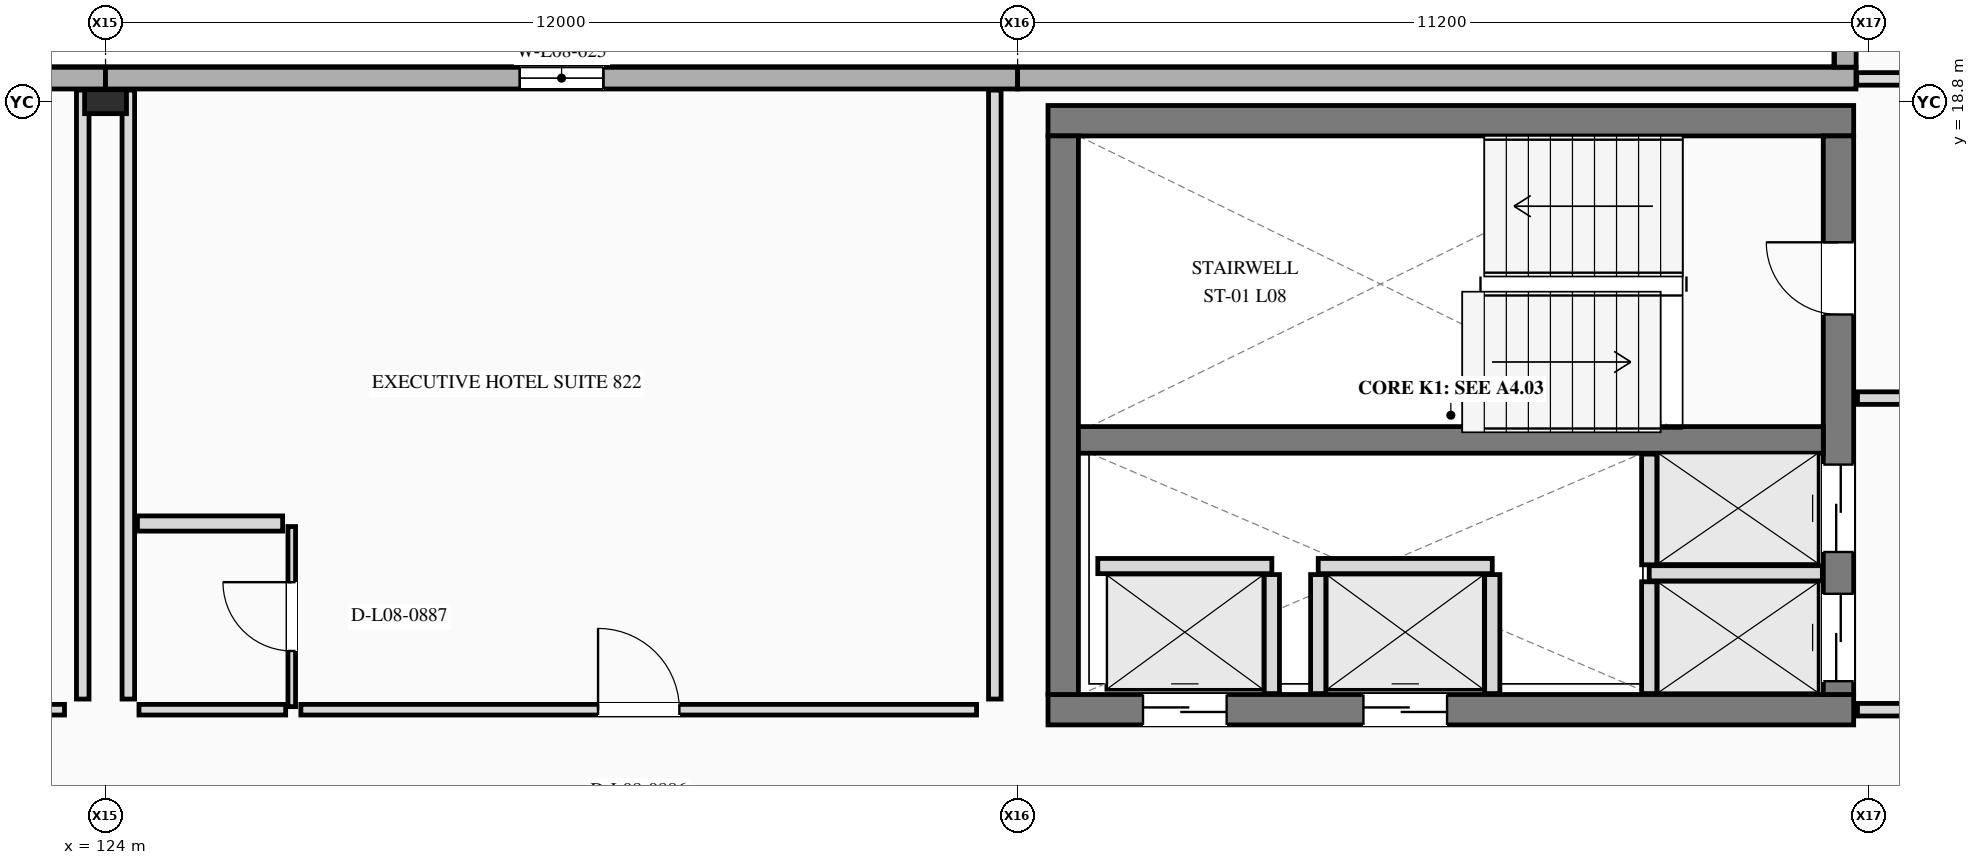
"""IFC4 building model, lengths in metres.
Left out: names, types, materials, properties, quantities, classifications, styles, units other than length and angle.
Written with IfcOpenShell. Run it as: python <this file> out.ifc"""

import sys

from ifc_helpers import new_model, si_unit, direction, frame, frame_2d, origin, origin_2d, place, context, subcontext, project, spatial, rectangle, i_section, extrude, element, fill, save


model = new_model("IFC4")
c1 = context("Model", 3, precision=1e-05, world=origin(), true_north=direction((0.0, 1.0)))
c2 = subcontext(c1, "Body", "Model", "MODEL_VIEW")
j1 = project(units=[si_unit("LENGTHUNIT", "METRE"), si_unit("PLANEANGLEUNIT", "RADIAN")], contexts=[c1])
p1 = place(None, origin())
s1 = spatial("IfcSite", under=j1, at=p1, CompositionType="ELEMENT")
p2 = place(p1, origin())
s2 = spatial("IfcBuilding", under=s1, at=p2, CompositionType="ELEMENT")
p3 = place(p2, frame((0.0, 0.0, 34.1)))
s3 = spatial("IfcBuildingStorey", under=s2, at=p3, CompositionType="ELEMENT", Elevation=34.1)
p4 = place(p3, frame((124.0, 18.8, 0.0), z_axis=(0.0, 0.0, 1.0), x_axis=(0.0, 1.0, 0.0)))
e1 = element("IfcColumn", 1, at=p4, inside=s3, PredefinedType="COLUMN", context=c2, shape_type="SweptSolid", body=[
    extrude(i_section(OverallWidth=0.315, OverallDepth=0.551, WebThickness=0.015, FlangeThickness=0.024, at=origin_2d()), origin(), (0.0, 0.0, 1.0), 3.5),
])
p5 = place(p3, frame((124.0, 19.11, 0.0), z_axis=(0.0, 0.0, 1.0), x_axis=(-1.0, 0.0, 0.0)))
e2 = element("IfcWall", 2, at=p5, inside=s3, PredefinedType="STANDARD", context=c2, shape_type="SweptSolid", body=[
    extrude(rectangle(XDim=12.0, YDim=0.285, at=frame_2d((6.0, 0.0))), origin(), (0.0, 0.0, 1.0), 3.5),
])
p6 = place(p5, frame((5.4, 0.0, 0.85)))
e3 = element("IfcOpeningElement", 3, at=p6, cuts=e2, PredefinedType="OPENING", context=c2, shape_type="SweptSolid", body=[
    extrude(rectangle(XDim=1.2, YDim=1.6, at=frame_2d((0.6, 0.8))), frame((0.0, 0.152, 0.0), z_axis=(0.0, -1.0, 0.0), x_axis=(1.0, 0.0, 0.0)), (0.0, 0.0, 1.0), 0.305),
])
p7 = place(p3, frame((136.0, 19.11, 0.0), z_axis=(0.0, 0.0, 1.0), x_axis=(-1.0, 0.0, 0.0)))
e4 = element("IfcWall", 4, at=p7, inside=s3, PredefinedType="STANDARD", context=c2, shape_type="SweptSolid", body=[
    extrude(rectangle(XDim=12.0, YDim=0.285, at=frame_2d((6.0, 0.0))), origin(), (0.0, 0.0, 1.0), 3.5),
])
p8 = place(p7, frame((5.45, 0.0, 0.85)))
e5 = element("IfcOpeningElement", 5, at=p8, cuts=e4, PredefinedType="OPENING", context=c2, shape_type="SweptSolid", body=[
    extrude(rectangle(XDim=1.1, YDim=1.5, at=frame_2d((0.55, 0.75))), frame((0.0, 0.152, 0.0), z_axis=(0.0, -1.0, 0.0), x_axis=(1.0, 0.0, 0.0)), (0.0, 0.0, 1.0), 0.305),
])
p9 = place(p3, frame((147.03, 19.11, 0.0), z_axis=(0.0, 0.0, 1.0), x_axis=(-1.0, 0.0, 0.0)))
e6 = element("IfcWall", 6, at=p9, inside=s3, PredefinedType="STANDARD", context=c2, shape_type="SweptSolid", body=[
    extrude(rectangle(XDim=11.03, YDim=0.285, at=frame_2d((5.515, 0.0))), origin(), (0.0, 0.0, 1.0), 3.5),
])
p10 = place(p3, frame((146.89, 19.254, 0.0), z_axis=(0.0, 0.0, 1.0), x_axis=(0.0, 1.0, 0.0)))
e7 = element("IfcWall", 7, at=p10, inside=s3, PredefinedType="STANDARD", context=c2, shape_type="SweptSolid", body=[
    extrude(rectangle(XDim=5.546, YDim=0.285, at=frame_2d((2.773, 0.0))), origin(), (0.0, 0.0, 1.0), 3.5),
])
p11 = place(p10, frame((1.698, 0.0, 0.85)))
e8 = element("IfcOpeningElement", 8, at=p11, cuts=e7, PredefinedType="OPENING", context=c2, shape_type="SweptSolid", body=[
    extrude(rectangle(XDim=1.8, YDim=1.8, at=frame_2d((0.9, 0.9))), frame((0.0, 0.152, 0.0), z_axis=(0.0, -1.0, 0.0), x_axis=(1.0, 0.0, 0.0)), (0.0, 0.0, 1.0), 0.305),
])
p12 = place(p3, frame((136.4, 10.8, 0.0), z_axis=(0.0, 0.0, 1.0), x_axis=(1.0, 0.0, 0.0)))
e9 = element("IfcWall", 9, at=p12, inside=s3, PredefinedType="SHEAR", context=c2, shape_type="SweptSolid", body=[
    extrude(rectangle(XDim=10.6, YDim=0.4, at=frame_2d((5.3, 0.0))), origin(), (0.0, 0.0, 1.0), 3.5),
])
p13 = place(p12, frame((1.25, 0.0, 0.0)))
e10 = element("IfcOpeningElement", 10, at=p13, cuts=e9, PredefinedType="OPENING", context=c2, shape_type="SweptSolid", body=[
    extrude(rectangle(XDim=1.1, YDim=2.2, at=frame_2d((0.55, 1.1))), frame((0.0, 0.21, 0.0), z_axis=(0.0, -1.0, 0.0), x_axis=(1.0, 0.0, 0.0)), (0.0, 0.0, 1.0), 0.42),
])
p14 = place(p12, frame((4.15, 0.0, 0.0)))
e11 = element("IfcOpeningElement", 11, at=p14, cuts=e9, PredefinedType="OPENING", context=c2, shape_type="SweptSolid", body=[
    extrude(rectangle(XDim=1.1, YDim=2.2, at=frame_2d((0.55, 1.1))), frame((0.0, 0.21, 0.0), z_axis=(0.0, -1.0, 0.0), x_axis=(1.0, 0.0, 0.0)), (0.0, 0.0, 1.0), 0.42),
])
p15 = place(p3, frame((147.0, 18.55, 0.0), z_axis=(0.0, 0.0, 1.0), x_axis=(-1.0, 0.0, 0.0)))
e12 = element("IfcWall", 12, at=p15, inside=s3, PredefinedType="SHEAR", context=c2, shape_type="SweptSolid", body=[
    extrude(rectangle(XDim=10.6, YDim=0.4, at=frame_2d((5.3, 0.0))), origin(), (0.0, 0.0, 1.0), 3.5),
])
p16 = place(p3, frame((136.6, 18.35, 0.0), z_axis=(0.0, 0.0, 1.0), x_axis=(0.0, -1.0, 0.0)))
e13 = element("IfcWall", 13, at=p16, inside=s3, PredefinedType="SHEAR", context=c2, shape_type="SweptSolid", body=[
    extrude(rectangle(XDim=7.35, YDim=0.4, at=frame_2d((3.675, 0.0))), origin(), (0.0, 0.0, 1.0), 3.5),
])
p17 = place(p3, frame((146.8, 11.0, 0.0), z_axis=(0.0, 0.0, 1.0), x_axis=(0.0, 1.0, 0.0)))
e14 = element("IfcWall", 14, at=p17, inside=s3, PredefinedType="SHEAR", context=c2, shape_type="SweptSolid", body=[
    extrude(rectangle(XDim=7.35, YDim=0.4, at=frame_2d((3.675, 0.0))), origin(), (0.0, 0.0, 1.0), 3.5),
])
p18 = place(p17, frame((5.0, 0.0, 0.0)))
e15 = element("IfcOpeningElement", 15, at=p18, cuts=e14, PredefinedType="OPENING", context=c2, shape_type="SweptSolid", body=[
    extrude(rectangle(XDim=0.95, YDim=2.2, at=frame_2d((0.475, 1.1))), frame((0.0, 0.21, 0.0), z_axis=(0.0, -1.0, 0.0), x_axis=(1.0, 0.0, 0.0)), (0.0, 0.0, 1.0), 0.42),
])
p19 = place(p17, frame((0.175, 0.0, 0.0)))
e16 = element("IfcOpeningElement", 16, at=p19, cuts=e14, PredefinedType="OPENING", context=c2, shape_type="SweptSolid", body=[
    extrude(rectangle(XDim=1.15, YDim=2.25, at=frame_2d((0.575, 1.125))), frame((0.0, 0.21, 0.0), z_axis=(0.0, -1.0, 0.0), x_axis=(1.0, 0.0, 0.0)), (0.0, 0.0, 1.0), 0.42),
])
p20 = place(p17, frame((1.875, 0.0, 0.0)))
e17 = element("IfcOpeningElement", 17, at=p20, cuts=e14, PredefinedType="OPENING", context=c2, shape_type="SweptSolid", body=[
    extrude(rectangle(XDim=1.15, YDim=2.25, at=frame_2d((0.575, 1.125))), frame((0.0, 0.21, 0.0), z_axis=(0.0, -1.0, 0.0), x_axis=(1.0, 0.0, 0.0)), (0.0, 0.0, 1.0), 0.42),
])
p21 = place(p3, frame((136.8, 14.35, 0.0), z_axis=(0.0, 0.0, 1.0), x_axis=(1.0, 0.0, 0.0)))
e18 = element("IfcWall", 18, at=p21, inside=s3, PredefinedType="SHEAR", context=c2, shape_type="SweptSolid", body=[
    extrude(rectangle(XDim=9.8, YDim=0.35, at=frame_2d((4.9, 0.0))), origin(), (0.0, 0.0, 1.0), 3.5),
])
p22 = place(p3, frame((137.055, 12.69, 0.0), z_axis=(0.0, 0.0, 1.0), x_axis=(1.0, 0.0, 0.0)))
e19 = element("IfcWall", 19, at=p22, inside=s3, PredefinedType="PLUMBINGWALL", context=c2, shape_type="SweptSolid", body=[
    extrude(rectangle(XDim=2.29, YDim=0.2, at=frame_2d((1.145, 0.0))), origin(), (0.0, 0.0, 1.0), 3.19),
])
p23 = place(p3, frame((139.345, 11.012, 0.0), z_axis=(0.0, 0.0, 1.0), x_axis=(0.0, 1.0, 0.0)))
e20 = element("IfcWall", 20, at=p23, inside=s3, PredefinedType="PLUMBINGWALL", context=c2, shape_type="SweptSolid", body=[
    extrude(rectangle(XDim=1.566, YDim=0.2, at=frame_2d((0.783, 0.0))), origin(), (0.0, 0.0, 1.0), 3.19),
])
p24 = place(p3, frame((139.955, 12.69, 0.0), z_axis=(0.0, 0.0, 1.0), x_axis=(1.0, 0.0, 0.0)))
e21 = element("IfcWall", 21, at=p24, inside=s3, PredefinedType="PLUMBINGWALL", context=c2, shape_type="SweptSolid", body=[
    extrude(rectangle(XDim=2.29, YDim=0.2, at=frame_2d((1.145, 0.0))), origin(), (0.0, 0.0, 1.0), 3.19),
])
for number, where, z_axis, x_axis in (
    (22, (139.955, 11.012, 0.0), (0.0, 0.0, 1.0), (0.0, 1.0, 0.0)),
    (23, (142.245, 11.012, 0.0), (0.0, 0.0, 1.0), (0.0, 1.0, 0.0)),
):
    element("IfcWall", number, at=place(p3, frame(where, z_axis=z_axis, x_axis=x_axis)), inside=s3, PredefinedType="PLUMBINGWALL", context=c2, shape_type="SweptSolid", body=[
        extrude(rectangle(XDim=1.566, YDim=0.2, at=frame_2d((0.783, 0.0))), origin(), (0.0, 0.0, 1.0), 3.19),
    ])
p25 = place(p3, frame((144.31, 12.595, 0.0), z_axis=(0.0, 0.0, 1.0), x_axis=(1.0, 0.0, 0.0)))
e24 = element("IfcWall", 24, at=p25, inside=s3, PredefinedType="PLUMBINGWALL", context=c2, shape_type="SweptSolid", body=[
    extrude(rectangle(XDim=2.278, YDim=0.2, at=frame_2d((1.139, 0.0))), origin(), (0.0, 0.0, 1.0), 3.19),
])
p26 = place(p3, frame((144.31, 11.012, 0.0), z_axis=(0.0, 0.0, 1.0), x_axis=(0.0, 1.0, 0.0)))
e25 = element("IfcWall", 25, at=p26, inside=s3, PredefinedType="PLUMBINGWALL", context=c2, shape_type="SweptSolid", body=[
    extrude(rectangle(XDim=1.471, YDim=0.2, at=frame_2d((0.735, 0.0))), origin(), (0.0, 0.0, 1.0), 3.19),
])
p27 = place(p3, frame((144.31, 12.707, 0.0), z_axis=(0.0, 0.0, 1.0), x_axis=(0.0, 1.0, 0.0)))
e26 = element("IfcWall", 26, at=p27, inside=s3, PredefinedType="PLUMBINGWALL", context=c2, shape_type="SweptSolid", body=[
    extrude(rectangle(XDim=1.456, YDim=0.2, at=frame_2d((0.728, 0.0))), origin(), (0.0, 0.0, 1.0), 3.19),
])
p28 = place(p3, frame((147.05, 10.8, 0.0), z_axis=(0.0, 0.0, 1.0), x_axis=(1.0, 0.0, 0.0)))
e27 = element("IfcWall", 27, at=p28, inside=s3, PredefinedType="PARTITIONING", context=c2, shape_type="SweptSolid", body=[
    extrude(rectangle(XDim=4.55, YDim=0.165, at=frame_2d((2.275, 0.0))), origin(), (0.0, 0.0, 1.0), 3.19),
])
p29 = place(p28, frame((1.725, 0.0, 0.0)))
e28 = element("IfcOpeningElement", 28, at=p29, cuts=e27, PredefinedType="OPENING", context=c2, shape_type="SweptSolid", body=[
    extrude(rectangle(XDim=1.1, YDim=2.2, at=frame_2d((0.55, 1.1))), frame((0.0, 0.093, 0.0), z_axis=(0.0, -1.0, 0.0), x_axis=(1.0, 0.0, 0.0)), (0.0, 0.0, 1.0), 0.185),
])
p30 = place(p3, frame((147.05, 14.9, 0.0), z_axis=(0.0, 0.0, 1.0), x_axis=(1.0, 0.0, 0.0)))
e29 = element("IfcWall", 29, at=p30, inside=s3, PredefinedType="PARTITIONING", context=c2, shape_type="SweptSolid", body=[
    extrude(rectangle(XDim=4.55, YDim=0.165, at=frame_2d((2.275, 0.0))), origin(), (0.0, 0.0, 1.0), 3.19),
])
p31 = place(p30, frame((1.8, 0.0, 0.0)))
e30 = element("IfcOpeningElement", 30, at=p31, cuts=e29, PredefinedType="OPENING", context=c2, shape_type="SweptSolid", body=[
    extrude(rectangle(XDim=0.95, YDim=2.2, at=frame_2d((0.475, 1.1))), frame((0.0, 0.093, 0.0), z_axis=(0.0, -1.0, 0.0), x_axis=(1.0, 0.0, 0.0)), (0.0, 0.0, 1.0), 0.185),
])
p32 = place(p3, frame((114.57, 10.8, 0.0), z_axis=(0.0, 0.0, 1.0), x_axis=(1.0, 0.0, 0.0)))
e31 = element("IfcWall", 31, at=p32, inside=s3, PredefinedType="PARTITIONING", context=c2, shape_type="SweptSolid", body=[
    extrude(rectangle(XDim=8.89, YDim=0.14, at=frame_2d((4.445, 0.0))), origin(), (0.0, 0.0, 1.0), 3.19),
])
p33 = place(p32, frame((3.94, 0.0, 0.0)))
e32 = element("IfcOpeningElement", 32, at=p33, cuts=e31, PredefinedType="OPENING", context=c2, shape_type="SweptSolid", body=[
    extrude(rectangle(XDim=1.01, YDim=2.2, at=frame_2d((0.505, 1.1))), frame((0.0, 0.08, 0.0), z_axis=(0.0, -1.0, 0.0), x_axis=(1.0, 0.0, 0.0)), (0.0, 0.0, 1.0), 0.16),
])
p34 = place(p3, frame((123.7, 10.94, 0.0), z_axis=(0.0, 0.0, 1.0), x_axis=(0.0, 1.0, 0.0)))
e33 = element("IfcWall", 33, at=p34, inside=s3, PredefinedType="PARTITIONING", context=c2, shape_type="SweptSolid", body=[
    extrude(rectangle(XDim=8.012, YDim=0.165, at=frame_2d((4.006, 0.0))), origin(), (0.0, 0.0, 1.0), 2.428),
])
p35 = place(p3, frame((124.44, 10.8, 0.0), z_axis=(0.0, 0.0, 1.0), x_axis=(1.0, 0.0, 0.0)))
e34 = element("IfcWall", 34, at=p35, inside=s3, PredefinedType="PARTITIONING", context=c2, shape_type="SweptSolid", body=[
    extrude(rectangle(XDim=1.93, YDim=0.14, at=frame_2d((0.965, 0.0))), origin(), (0.0, 0.0, 1.0), 3.19),
])
p36 = place(p3, frame((126.57, 10.8, 0.0), z_axis=(0.0, 0.0, 1.0), x_axis=(1.0, 0.0, 0.0)))
e35 = element("IfcWall", 35, at=p36, inside=s3, PredefinedType="PARTITIONING", context=c2, shape_type="SweptSolid", body=[
    extrude(rectangle(XDim=8.89, YDim=0.14, at=frame_2d((4.445, 0.0))), origin(), (0.0, 0.0, 1.0), 3.19),
])
p37 = place(p36, frame((3.91, 0.0, 0.0)))
e36 = element("IfcOpeningElement", 36, at=p37, cuts=e35, PredefinedType="OPENING", context=c2, shape_type="SweptSolid", body=[
    extrude(rectangle(XDim=1.07, YDim=2.25, at=frame_2d((0.535, 1.125))), frame((0.0, 0.08, 0.0), z_axis=(0.0, -1.0, 0.0), x_axis=(1.0, 0.0, 0.0)), (0.0, 0.0, 1.0), 0.16),
])
p38 = place(p3, frame((124.3, 10.94, 0.0), z_axis=(0.0, 0.0, 1.0), x_axis=(0.0, 1.0, 0.0)))
e37 = element("IfcWall", 37, at=p38, inside=s3, PredefinedType="PARTITIONING", context=c2, shape_type="SweptSolid", body=[
    extrude(rectangle(XDim=8.012, YDim=0.165, at=frame_2d((4.006, 0.0))), origin(), (0.0, 0.0, 1.0), 2.519),
])
p39 = place(p3, frame((135.7, 10.94, 0.0), z_axis=(0.0, 0.0, 1.0), x_axis=(0.0, 1.0, 0.0)))
e38 = element("IfcWall", 38, at=p39, inside=s3, PredefinedType="PARTITIONING", context=c2, shape_type="SweptSolid", body=[
    extrude(rectangle(XDim=8.012, YDim=0.165, at=frame_2d((4.006, 0.0))), origin(), (0.0, 0.0, 1.0), 3.19),
])
p40 = place(p3, frame((126.45, 10.84, 0.0), z_axis=(0.0, 0.0, 1.0), x_axis=(0.0, 1.0, 0.0)))
e39 = element("IfcWall", 39, at=p40, inside=s3, PredefinedType="PARTITIONING", context=c2, shape_type="SweptSolid", body=[
    extrude(rectangle(XDim=2.37, YDim=0.1, at=frame_2d((1.185, 0.0))), origin(), (0.0, 0.0, 1.0), 3.19),
])
p41 = place(p40, frame((0.733, 0.0, 0.0)))
e40 = element("IfcOpeningElement", 40, at=p41, cuts=e39, PredefinedType="OPENING", context=c2, shape_type="SweptSolid", body=[
    extrude(rectangle(XDim=0.905, YDim=2.18, at=frame_2d((0.453, 1.09))), frame((0.0, 0.06, 0.0), z_axis=(0.0, -1.0, 0.0), x_axis=(1.0, 0.0, 0.0)), (0.0, 0.0, 1.0), 0.12),
])
p42 = place(p3, frame((124.42, 13.25, 0.0), z_axis=(0.0, 0.0, 1.0), x_axis=(1.0, 0.0, 0.0)))
e41 = element("IfcWall", 41, at=p42, inside=s3, PredefinedType="PLUMBINGWALL", context=c2, shape_type="SweptSolid", body=[
    extrude(rectangle(XDim=1.91, YDim=0.2, at=frame_2d((0.955, 0.0))), origin(), (0.0, 0.0, 1.0), 3.19),
])
p43 = place(p3, frame((147.04, 19.1, 0.0), z_axis=(0.0, 0.0, 1.0), x_axis=(1.0, 0.0, 0.0)))
e42 = element("IfcWall", 42, at=p43, inside=s3, PredefinedType="PARTITIONING", context=c2, shape_type="SweptSolid", body=[
    extrude(rectangle(XDim=8.22, YDim=0.165, at=frame_2d((4.11, 0.0))), origin(), (0.0, 0.0, 1.0), 3.19),
])
p44 = place(p8, origin())
e43 = element("IfcWindow", 43, at=p44, inside=s3, PartitioningType="SINGLE_PANEL", PredefinedType="WINDOW", context=c2, shape_type="SweptSolid", body=[
    extrude(rectangle(XDim=1.1, YDim=1.5, at=frame_2d((0.55, 0.75))), frame((0.0, 0.03, 0.0), z_axis=(0.0, -1.0, 0.0), x_axis=(1.0, 0.0, 0.0)), (0.0, 0.0, 1.0), 0.06),
])
fill(e5, e43)
p45 = place(p18, origin())
e44 = element("IfcDoor", 44, at=p45, inside=s3, OperationType="SINGLE_SWING_RIGHT", PredefinedType="DOOR", context=c2, shape_type="SweptSolid", body=[
    extrude(rectangle(XDim=0.95, YDim=2.2, at=frame_2d((0.475, 1.1))), frame((0.0, 0.025, 0.0), z_axis=(0.0, -1.0, 0.0), x_axis=(1.0, 0.0, 0.0)), (0.0, 0.0, 1.0), 0.05),
])
fill(e15, e44)
p46 = place(p13, origin())
e45 = element("IfcDoor", 45, at=p46, inside=s3, OperationType="SLIDING_TO_LEFT", PredefinedType="DOOR", context=c2, shape_type="SweptSolid", body=[
    extrude(rectangle(XDim=1.1, YDim=2.2, at=frame_2d((0.55, 1.1))), frame((0.0, 0.025, 0.0), z_axis=(0.0, -1.0, 0.0), x_axis=(1.0, 0.0, 0.0)), (0.0, 0.0, 1.0), 0.05),
])
fill(e10, e45)
p47 = place(p14, origin())
e46 = element("IfcDoor", 46, at=p47, inside=s3, OperationType="SLIDING_TO_RIGHT", PredefinedType="DOOR", context=c2, shape_type="SweptSolid", body=[
    extrude(rectangle(XDim=1.1, YDim=2.2, at=frame_2d((0.55, 1.1))), frame((0.0, 0.025, 0.0), z_axis=(0.0, -1.0, 0.0), x_axis=(1.0, 0.0, 0.0)), (0.0, 0.0, 1.0), 0.05),
])
fill(e11, e46)
p48 = place(p19, origin())
e47 = element("IfcDoor", 47, at=p48, inside=s3, OperationType="SLIDING_TO_LEFT", PredefinedType="DOOR", context=c2, shape_type="SweptSolid", body=[
    extrude(rectangle(XDim=1.15, YDim=2.25, at=frame_2d((0.575, 1.125))), frame((0.0, 0.025, 0.0), z_axis=(0.0, -1.0, 0.0), x_axis=(1.0, 0.0, 0.0)), (0.0, 0.0, 1.0), 0.05),
])
fill(e16, e47)
p49 = place(p20, origin())
e48 = element("IfcDoor", 48, at=p49, inside=s3, OperationType="SLIDING_TO_RIGHT", PredefinedType="DOOR", context=c2, shape_type="SweptSolid", body=[
    extrude(rectangle(XDim=1.15, YDim=2.25, at=frame_2d((0.575, 1.125))), frame((0.0, 0.025, 0.0), z_axis=(0.0, -1.0, 0.0), x_axis=(1.0, 0.0, 0.0)), (0.0, 0.0, 1.0), 0.05),
])
fill(e17, e48)
p50 = place(p37, origin())
e49 = element("IfcDoor", 49, at=p50, inside=s3, OperationType="SINGLE_SWING_LEFT", PredefinedType="DOOR", context=c2, shape_type="SweptSolid", body=[
    extrude(rectangle(XDim=1.07, YDim=2.25, at=frame_2d((0.535, 1.125))), frame((0.0, 0.025, 0.0), z_axis=(0.0, -1.0, 0.0), x_axis=(1.0, 0.0, 0.0)), (0.0, 0.0, 1.0), 0.05),
])
fill(e36, e49)
p51 = place(p41, origin())
e50 = element("IfcDoor", 50, at=p51, inside=s3, OperationType="SINGLE_SWING_RIGHT", PredefinedType="DOOR", context=c2, shape_type="SweptSolid", body=[
    extrude(rectangle(XDim=0.905, YDim=2.18, at=frame_2d((0.453, 1.09))), frame((0.0, 0.025, 0.0), z_axis=(0.0, -1.0, 0.0), x_axis=(1.0, 0.0, 0.0)), (0.0, 0.0, 1.0), 0.05),
])
fill(e40, e50)
save(model, sys.argv[1])
